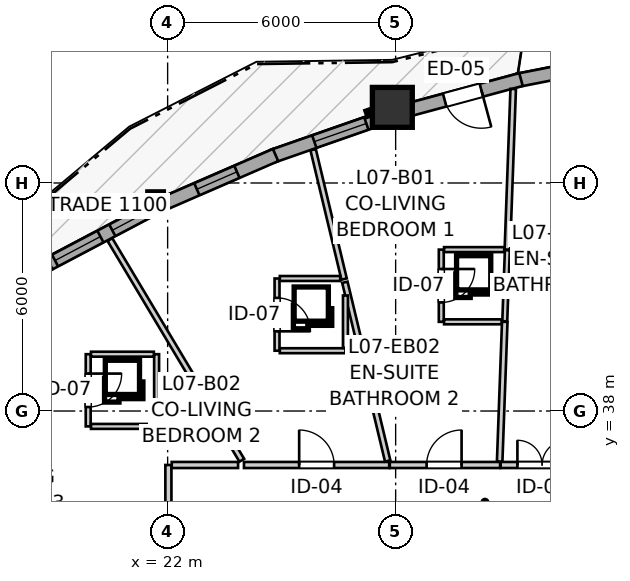
"""IFC4 building model, lengths in metres.
Left out: names, types, materials, properties, quantities, classifications, styles, units other than length and angle.
Written with IfcOpenShell. Run it as: python <this file> out.ifc"""

import sys

from ifc_helpers import new_model, si_unit, direction, frame, frame_2d, origin, origin_2d, place, context, subcontext, project, spatial, rectangle, i_section, extrude, source, transform, mapped, element, fill, save


model = new_model("IFC4")
c1 = context("Model", 3, precision=1e-05, world=origin(), true_north=direction((0.0, 1.0)))
c2 = subcontext(c1, "Body", "Model", "MODEL_VIEW")
j1 = project(units=[si_unit("LENGTHUNIT", "METRE"), si_unit("PLANEANGLEUNIT", "RADIAN")], contexts=[c1])
p1 = place(None, origin())
s1 = spatial("IfcSite", under=j1, at=p1, CompositionType="ELEMENT")
p2 = place(p1, origin())
s2 = spatial("IfcBuilding", under=s1, at=p2, CompositionType="ELEMENT")
p3 = place(p2, frame((0.0, 0.0, 27.0)))
s3 = spatial("IfcBuildingStorey", under=s2, at=p3, CompositionType="ELEMENT", Elevation=27.0)
m1 = source(origin(), c2, "Body", "SweptSolid", [
    extrude(rectangle(XDim=1.05, YDim=1.05, at=origin_2d()), origin(), (0.0, 0.0, 1.0), 2.935),
])
p4 = place(p3, frame((27.913, 45.99, 0.0), z_axis=(0.0, 0.0, 1.0), x_axis=(1.0, 0.0, 0.0)))
e1 = element("IfcColumn", 1, at=p4, inside=s3, PredefinedType="COLUMN", context=c2, shape_type="MappedRepresentation", body=[
    mapped(m1, transform((0.0, 0.0, 0.0), x_axis=(1.0, 0.0, 0.0), y_axis=(0.0, 1.0, 0.0), z_axis=(0.0, 0.0, 1.0), scale=1.0)),
])
m2 = source(origin(), c2, "Body", "SweptSolid", [
    extrude(i_section(OverallWidth=0.409, OverallDepth=0.425, WebThickness=0.03, FlangeThickness=0.048, FilletRadius=0.015, at=origin_2d()), origin(), (0.0, 0.0, 1.0), 2.935),
])
p5 = place(p3, frame((21.683, 43.554, 0.0), z_axis=(0.0, 0.0, 1.0), x_axis=(1.0, 0.0, 0.0)))
e2 = element("IfcColumn", 2, at=p5, inside=s3, PredefinedType="PILASTER", context=c2, shape_type="MappedRepresentation", body=[
    mapped(m2, transform((0.0, 0.0, 0.0), x_axis=(1.0, 0.0, 0.0), y_axis=(0.0, 1.0, 0.0), z_axis=(0.0, 0.0, 1.0), scale=1.0)),
])
p6 = place(p3, frame((34.659, 47.38, 0.0), z_axis=(0.0, 0.0, 1.0), x_axis=(-0.981222284826, -0.19288034571, 0.0)))
e3 = element("IfcWall", 3, at=p6, inside=s3, PredefinedType="SOLIDWALL", context=c2, shape_type="SweptSolid", body=[
    extrude(rectangle(XDim=3.512, YDim=0.35, at=frame_2d((1.756, 0.0))), origin(), (0.0, 0.0, 1.0), 2.415),
])
p7 = place(p6, frame((1.021, 0.0, 0.82)))
e4 = element("IfcOpeningElement", 4, at=p7, cuts=e3, PredefinedType="OPENING", context=c2, shape_type="SweptSolid", body=[
    extrude(rectangle(XDim=1.45, YDim=1.25, at=frame_2d((0.725, 0.625))), frame((0.0, 0.185, 0.0), z_axis=(0.0, -1.0, 0.0), x_axis=(1.0, 0.0, 0.0)), (0.0, 0.0, 1.0), 0.37),
])
p8 = place(p3, frame((31.298, 46.722, 0.0), z_axis=(0.0, 0.0, 1.0), x_axis=(-0.965455913242, -0.260566459057, 0.0)))
e5 = element("IfcWall", 5, at=p8, inside=s3, PredefinedType="SOLIDWALL", context=c2, shape_type="SweptSolid", body=[
    extrude(rectangle(XDim=3.159, YDim=0.35, at=frame_2d((1.58, 0.0))), origin(), (0.0, 0.0, 1.0), 2.415),
])
p9 = place(p8, frame((1.08, 0.0, 0.0)))
e6 = element("IfcOpeningElement", 6, at=p9, cuts=e5, PredefinedType="OPENING", context=c2, shape_type="SweptSolid", body=[
    extrude(rectangle(XDim=1.0, YDim=2.1, at=frame_2d((0.5, 1.05))), frame((0.0, 0.185, 0.0), z_axis=(0.0, -1.0, 0.0), x_axis=(1.0, 0.0, 0.0)), (0.0, 0.0, 1.0), 0.37),
])
p10 = place(p3, frame((27.687, 45.726, 0.0), z_axis=(0.0, 0.0, 1.0), x_axis=(-0.9441205041, -0.329600475936, 0.0)))
e7 = element("IfcWall", 7, at=p10, inside=s3, PredefinedType="SOLIDWALL", context=c2, shape_type="SweptSolid", body=[
    extrude(rectangle(XDim=3.104, YDim=0.35, at=frame_2d((1.552, 0.0))), origin(), (0.0, 0.0, 1.0), 2.415),
])
p11 = place(p10, frame((0.486, 0.0, 0.82)))
e8 = element("IfcOpeningElement", 8, at=p11, cuts=e7, PredefinedType="OPENING", context=c2, shape_type="SweptSolid", body=[
    extrude(rectangle(XDim=1.45, YDim=1.25, at=frame_2d((0.725, 0.625))), frame((0.0, 0.185, 0.0), z_axis=(0.0, -1.0, 0.0), x_axis=(1.0, 0.0, 0.0)), (0.0, 0.0, 1.0), 0.37),
])
p12 = place(p3, frame((24.84, 44.735, 0.0), z_axis=(0.0, 0.0, 1.0), x_axis=(-0.917090935142, -0.398678086532, 0.0)))
e9 = element("IfcWall", 9, at=p12, inside=s3, PredefinedType="SOLIDWALL", context=c2, shape_type="SweptSolid", body=[
    extrude(rectangle(XDim=3.346, YDim=0.35, at=frame_2d((1.673, 0.0))), origin(), (0.0, 0.0, 1.0), 2.415),
])
p13 = place(p12, frame((1.108, 0.0, 0.82)))
e10 = element("IfcOpeningElement", 10, at=p13, cuts=e9, PredefinedType="OPENING", context=c2, shape_type="SweptSolid", body=[
    extrude(rectangle(XDim=1.15, YDim=1.2, at=frame_2d((0.575, 0.6))), frame((0.0, 0.185, 0.0), z_axis=(0.0, -1.0, 0.0), x_axis=(1.0, 0.0, 0.0)), (0.0, 0.0, 1.0), 0.37),
])
p14 = place(p3, frame((21.747, 43.39, 0.0), z_axis=(0.0, 0.0, 1.0), x_axis=(-0.88437802144, -0.46677137358, 0.0)))
e11 = element("IfcWall", 11, at=p14, inside=s3, PredefinedType="SOLIDWALL", context=c2, shape_type="SweptSolid", body=[
    extrude(rectangle(XDim=3.327, YDim=0.35, at=frame_2d((1.664, 0.0))), origin(), (0.0, 0.0, 1.0), 2.415),
])
p15 = place(p14, frame((0.311, 0.0, 0.82)))
e12 = element("IfcOpeningElement", 12, at=p15, cuts=e11, PredefinedType="OPENING", context=c2, shape_type="SweptSolid", body=[
    extrude(rectangle(XDim=1.05, YDim=1.45, at=frame_2d((0.525, 0.725))), frame((0.0, 0.185, 0.0), z_axis=(0.0, -1.0, 0.0), x_axis=(1.0, 0.0, 0.0)), (0.0, 0.0, 1.0), 0.37),
])
p16 = place(p14, frame((1.714, 0.0, 0.82)))
e13 = element("IfcOpeningElement", 13, at=p16, cuts=e11, PredefinedType="OPENING", context=c2, shape_type="SweptSolid", body=[
    extrude(rectangle(XDim=1.35, YDim=1.45, at=frame_2d((0.675, 0.725))), frame((0.0, 0.185, 0.0), z_axis=(0.0, -1.0, 0.0), x_axis=(1.0, 0.0, 0.0)), (0.0, 0.0, 1.0), 0.37),
])
p17 = place(p3, frame((18.882, 41.882, 0.0), z_axis=(0.0, 0.0, 1.0), x_axis=(-0.846428134238, -0.53250297048, 0.0)))
e14 = element("IfcWall", 14, at=p17, inside=s3, PredefinedType="SOLIDWALL", context=c2, shape_type="SweptSolid", body=[
    extrude(rectangle(XDim=3.047, YDim=0.35, at=frame_2d((1.523, 0.0))), origin(), (0.0, 0.0, 1.0), 2.415),
])
p18 = place(p17, frame((0.803, 0.0, 0.82)))
e15 = element("IfcOpeningElement", 15, at=p18, cuts=e14, PredefinedType="OPENING", context=c2, shape_type="SweptSolid", body=[
    extrude(rectangle(XDim=1.45, YDim=1.25, at=frame_2d((0.725, 0.625))), frame((0.0, 0.185, 0.0), z_axis=(0.0, -1.0, 0.0), x_axis=(1.0, 0.0, 0.0)), (0.0, 0.0, 1.0), 0.37),
])
p19 = place(p3, frame((22.02, 32.71, 0.0), z_axis=(0.0, 0.0, 1.0), x_axis=(0.0, 1.0, 0.0)))
e16 = element("IfcWall", 16, at=p19, inside=s3, PredefinedType="PARTITIONING", context=c2, shape_type="SweptSolid", body=[
    extrude(rectangle(XDim=3.87, YDim=0.16, at=frame_2d((1.935, 0.0))), origin(), (0.0, 0.0, 1.0), 2.935),
])
p20 = place(p19, frame((1.485, 0.0, 0.0)))
e17 = element("IfcOpeningElement", 17, at=p20, cuts=e16, PredefinedType="OPENING", context=c2, shape_type="SweptSolid", body=[
    extrude(rectangle(XDim=0.92, YDim=2.1, at=frame_2d((0.46, 1.05))), frame((0.0, 0.09, 0.0), z_axis=(0.0, -1.0, 0.0), x_axis=(1.0, 0.0, 0.0)), (0.0, 0.0, 1.0), 0.18),
])
p21 = place(p3, frame((24.009, 36.58, 0.0), z_axis=(0.0, 0.0, 1.0), x_axis=(1.0, 0.0, 0.0)))
e18 = element("IfcWall", 18, at=p21, inside=s3, PredefinedType="PARTITIONING", context=c2, shape_type="SweptSolid", body=[
    extrude(rectangle(XDim=3.822, YDim=0.16, at=frame_2d((1.911, 0.0))), origin(), (0.0, 0.0, 1.0), 2.543),
])
p22 = place(p21, frame((1.452, 0.0, 0.0)))
e19 = element("IfcOpeningElement", 19, at=p22, cuts=e18, PredefinedType="OPENING", context=c2, shape_type="SweptSolid", body=[
    extrude(rectangle(XDim=0.92, YDim=2.1, at=frame_2d((0.46, 1.05))), frame((0.0, 0.09, 0.0), z_axis=(0.0, -1.0, 0.0), x_axis=(1.0, 0.0, 0.0)), (0.0, 0.0, 1.0), 0.18),
])
p23 = place(p3, frame((27.846, 36.58, 0.0), z_axis=(0.0, 0.0, 1.0), x_axis=(1.0, 0.0, 0.0)))
e20 = element("IfcWall", 20, at=p23, inside=s3, PredefinedType="PARTITIONING", context=c2, shape_type="SweptSolid", body=[
    extrude(rectangle(XDim=2.903, YDim=0.16, at=frame_2d((1.452, 0.0))), origin(), (0.0, 0.0, 1.0), 2.935),
])
p24 = place(p23, frame((0.969, 0.0, 0.0)))
e21 = element("IfcOpeningElement", 21, at=p24, cuts=e20, PredefinedType="OPENING", context=c2, shape_type="SweptSolid", body=[
    extrude(rectangle(XDim=0.92, YDim=2.1, at=frame_2d((0.46, 1.05))), frame((0.0, 0.09, 0.0), z_axis=(0.0, -1.0, 0.0), x_axis=(1.0, 0.0, 0.0)), (0.0, 0.0, 1.0), 0.18),
])
p25 = place(p3, frame((30.764, 36.58, 0.0), z_axis=(0.0, 0.0, 1.0), x_axis=(1.0, 0.0, 0.0)))
e22 = element("IfcWall", 22, at=p25, inside=s3, PredefinedType="PARTITIONING", context=c2, shape_type="SweptSolid", body=[
    extrude(rectangle(XDim=2.225, YDim=0.16, at=frame_2d((1.113, 0.0))), origin(), (0.0, 0.0, 1.0), 2.935),
])
p26 = place(p25, frame((0.44, 0.0, 0.0)))
e23 = element("IfcOpeningElement", 23, at=p26, cuts=e22, PredefinedType="OPENING", context=c2, shape_type="SweptSolid", body=[
    extrude(rectangle(XDim=1.3, YDim=2.1, at=frame_2d((0.65, 1.05))), frame((0.0, 0.09, 0.0), z_axis=(0.0, -1.0, 0.0), x_axis=(1.0, 0.0, 0.0)), (0.0, 0.0, 1.0), 0.18),
])
p27 = place(p3, frame((29.201, 42.247, 0.0), z_axis=(0.0, 0.0, 1.0), x_axis=(0.0, -1.0, 0.0)))
e24 = element("IfcWall", 24, at=p27, inside=s3, PredefinedType="PARTITIONING", context=c2, shape_type="SweptSolid", body=[
    extrude(rectangle(XDim=1.9, YDim=0.13, at=frame_2d((0.95, 0.0))), origin(), (0.0, 0.0, 1.0), 2.935),
])
p28 = place(p27, frame((0.51, 0.0, 0.0)))
e25 = element("IfcOpeningElement", 25, at=p28, cuts=e24, PredefinedType="OPENING", context=c2, shape_type="SweptSolid", body=[
    extrude(rectangle(XDim=0.88, YDim=2.05, at=frame_2d((0.44, 1.025))), frame((0.0, 0.075, 0.0), z_axis=(0.0, -1.0, 0.0), x_axis=(1.0, 0.0, 0.0)), (0.0, 0.0, 1.0), 0.15),
])
p29 = place(p3, frame((24.879, 41.487, 0.0), z_axis=(0.0, 0.0, 1.0), x_axis=(0.0, -1.0, 0.0)))
e26 = element("IfcWall", 26, at=p29, inside=s3, PredefinedType="PARTITIONING", context=c2, shape_type="SweptSolid", body=[
    extrude(rectangle(XDim=1.9, YDim=0.13, at=frame_2d((0.95, 0.0))), origin(), (0.0, 0.0, 1.0), 2.935),
])
p30 = place(p29, frame((0.51, 0.0, 0.0)))
e27 = element("IfcOpeningElement", 27, at=p30, cuts=e26, PredefinedType="OPENING", context=c2, shape_type="SweptSolid", body=[
    extrude(rectangle(XDim=0.88, YDim=2.05, at=frame_2d((0.44, 1.025))), frame((0.0, 0.075, 0.0), z_axis=(0.0, -1.0, 0.0), x_axis=(1.0, 0.0, 0.0)), (0.0, 0.0, 1.0), 0.15),
])
p31 = place(p3, frame((19.91, 39.495, 0.0), z_axis=(0.0, 0.0, 1.0), x_axis=(0.0, -1.0, 0.0)))
e28 = element("IfcWall", 28, at=p31, inside=s3, PredefinedType="PARTITIONING", context=c2, shape_type="SweptSolid", body=[
    extrude(rectangle(XDim=1.9, YDim=0.13, at=frame_2d((0.95, 0.0))), origin(), (0.0, 0.0, 1.0), 2.935),
])
p32 = place(p31, frame((0.51, 0.0, 0.0)))
e29 = element("IfcOpeningElement", 29, at=p32, cuts=e28, PredefinedType="OPENING", context=c2, shape_type="SweptSolid", body=[
    extrude(rectangle(XDim=0.88, YDim=2.05, at=frame_2d((0.44, 1.025))), frame((0.0, 0.075, 0.0), z_axis=(0.0, -1.0, 0.0), x_axis=(1.0, 0.0, 0.0)), (0.0, 0.0, 1.0), 0.15),
])
p33 = place(p3, frame((11.92, 36.618, 0.0), z_axis=(0.0, 0.0, 1.0), x_axis=(0.866473494239, -0.499223080177, 0.0)))
e30 = element("IfcWall", 30, at=p33, inside=s3, PredefinedType="PARTITIONING", context=c2, shape_type="SweptSolid", body=[
    extrude(rectangle(XDim=11.514, YDim=0.145, at=frame_2d((5.757, 0.0))), origin(), (0.0, 0.0, 1.0), 2.935),
])
p34 = place(p3, frame((14.566, 38.751, 0.0), z_axis=(0.0, 0.0, 1.0), x_axis=(0.777881688073, -0.628410756879, 0.0)))
e31 = element("IfcWall", 31, at=p34, inside=s3, PredefinedType="PARTITIONING", context=c2, shape_type="SweptSolid", body=[
    extrude(rectangle(XDim=9.413, YDim=0.145, at=frame_2d((4.707, 0.0))), origin(), (0.0, 0.0, 1.0), 2.935),
])
p35 = place(p3, frame((20.481, 42.51, 0.0), z_axis=(0.0, 0.0, 1.0), x_axis=(0.513067331262, -0.858348363773, 0.0)))
e32 = element("IfcWall", 32, at=p35, inside=s3, PredefinedType="PARTITIONING", context=c2, shape_type="SweptSolid", body=[
    extrude(rectangle(XDim=6.765, YDim=0.145, at=frame_2d((3.382, 0.0))), origin(), (0.0, 0.0, 1.0), 2.935),
])
p36 = place(p3, frame((26.664, 41.388, 0.0), z_axis=(0.0, 0.0, 1.0), x_axis=(0.233021630241, -0.972471552201, 0.0)))
e33 = element("IfcWall", 33, at=p36, inside=s3, PredefinedType="PARTITIONING", context=c2, shape_type="SweptSolid", body=[
    extrude(rectangle(XDim=4.836, YDim=0.145, at=frame_2d((2.418, 0.0))), origin(), (0.0, 0.0, 1.0), 2.935),
])
p37 = place(p3, frame((30.94, 42.247, 0.0), z_axis=(0.0, 0.0, 1.0), x_axis=(0.03624948077, 0.999342771597, 0.0)))
e34 = element("IfcWall", 34, at=p37, inside=s3, PredefinedType="PARTITIONING", context=c2, shape_type="SweptSolid", body=[
    extrude(rectangle(XDim=4.229, YDim=0.145, at=frame_2d((2.115, 0.0))), origin(), (0.0, 0.0, 1.0), 2.935),
])
p38 = place(p3, frame((30.737, 36.671, 0.0), z_axis=(0.0, 0.0, 1.0), x_axis=(0.036368539535, 0.999338445839, 0.0)))
e35 = element("IfcWall", 35, at=p38, inside=s3, PredefinedType="PARTITIONING", context=c2, shape_type="SweptSolid", body=[
    extrude(rectangle(XDim=3.679, YDim=0.145, at=frame_2d((1.839, 0.0))), origin(), (0.0, 0.0, 1.0), 2.935),
])
p39 = place(p3, frame((25.829, 44.875, 0.0), z_axis=(0.0, 0.0, 1.0), x_axis=(0.232921769711, -0.972495475154, 0.0)))
e36 = element("IfcWall", 36, at=p39, inside=s3, PredefinedType="PARTITIONING", context=c2, shape_type="SweptSolid", body=[
    extrude(rectangle(XDim=3.5, YDim=0.145, at=frame_2d((1.75, 0.0))), origin(), (0.0, 0.0, 1.0), 2.935),
])
p40 = place(p3, frame((22.108, 36.58, 0.0), z_axis=(0.0, 0.0, 1.0), x_axis=(1.0, 0.0, 0.0)))
e37 = element("IfcWall", 37, at=p40, inside=s3, PredefinedType="PARTITIONING", context=c2, shape_type="SweptSolid", body=[
    extrude(rectangle(XDim=1.746, YDim=0.16, at=frame_2d((0.873, 0.0))), origin(), (0.0, 0.0, 1.0), 2.543),
])
p41 = place(p3, frame((21.71, 37.595, 0.0), z_axis=(0.0, 0.0, 1.0), x_axis=(0.0, 1.0, 0.0)))
e38 = element("IfcWall", 38, at=p41, inside=s3, PredefinedType="PARTITIONING", context=c2, shape_type="SweptSolid", body=[
    extrude(rectangle(XDim=1.9, YDim=0.13, at=frame_2d((0.95, 0.0))), origin(), (0.0, 0.0, 1.0), 2.935),
])
p42 = place(p3, frame((30.872, 40.362, 0.0), z_axis=(0.0, 0.0, 1.0), x_axis=(0.036273279858, 0.999341908042, 0.0)))
e39 = element("IfcWall", 39, at=p42, inside=s3, PredefinedType="PARTITIONING", context=c2, shape_type="SweptSolid", body=[
    extrude(rectangle(XDim=1.871, YDim=0.13, at=frame_2d((0.936, 0.0))), origin(), (0.0, 0.0, 1.0), 2.935),
])
for number, where, z_axis, x_axis in (
    (40, (19.983, 39.495, 0.0), (0.0, 0.0, 1.0), (1.0, 0.0, 0.0)),
    (41, (19.983, 37.595, 0.0), (0.0, 0.0, 1.0), (1.0, 0.0, 0.0)),
):
    element("IfcWall", number, at=place(p3, frame(where, z_axis=z_axis, x_axis=x_axis)), inside=s3, PredefinedType="PARTITIONING", context=c2, shape_type="SweptSolid", body=[
        extrude(rectangle(XDim=1.654, YDim=0.13, at=frame_2d((0.827, 0.0))), origin(), (0.0, 0.0, 1.0), 2.935),
    ])
p43 = place(p3, frame((24.952, 39.587, 0.0), z_axis=(0.0, 0.0, 1.0), x_axis=(1.0, 0.0, 0.0)))
e42 = element("IfcWall", 42, at=p43, inside=s3, PredefinedType="PARTITIONING", context=c2, shape_type="SweptSolid", body=[
    extrude(rectangle(XDim=1.727, YDim=0.13, at=frame_2d((0.864, 0.0))), origin(), (0.0, 0.0, 1.0), 2.935),
])
p44 = place(p3, frame((24.952, 41.487, 0.0), z_axis=(0.0, 0.0, 1.0), x_axis=(1.0, 0.0, 0.0)))
e43 = element("IfcWall", 43, at=p44, inside=s3, PredefinedType="PARTITIONING", context=c2, shape_type="SweptSolid", body=[
    extrude(rectangle(XDim=1.59, YDim=0.13, at=frame_2d((0.795, 0.0))), origin(), (0.0, 0.0, 1.0), 2.503),
])
p45 = place(p3, frame((29.274, 42.247, 0.0), z_axis=(0.0, 0.0, 1.0), x_axis=(1.0, 0.0, 0.0)))
e44 = element("IfcWall", 44, at=p45, inside=s3, PredefinedType="PARTITIONING", context=c2, shape_type="SweptSolid", body=[
    extrude(rectangle(XDim=1.583, YDim=0.13, at=frame_2d((0.792, 0.0))), origin(), (0.0, 0.0, 1.0), 2.503),
])
p46 = place(p3, frame((26.679, 39.66, 0.0), z_axis=(0.0, 0.0, 1.0), x_axis=(0.0, 1.0, 0.0)))
e45 = element("IfcWall", 45, at=p46, inside=s3, PredefinedType="PARTITIONING", context=c2, shape_type="SweptSolid", body=[
    extrude(rectangle(XDim=1.38, YDim=0.13, at=frame_2d((0.69, 0.0))), origin(), (0.0, 0.0, 1.0), 2.935),
])
p47 = place(p3, frame((29.274, 40.347, 0.0), z_axis=(0.0, 0.0, 1.0), x_axis=(1.0, 0.0, 0.0)))
e46 = element("IfcWall", 46, at=p47, inside=s3, PredefinedType="PARTITIONING", context=c2, shape_type="SweptSolid", body=[
    extrude(rectangle(XDim=1.514, YDim=0.13, at=frame_2d((0.757, 0.0))), origin(), (0.0, 0.0, 1.0), 2.935),
])
m3 = source(origin(), c2, "Body", "SweptSolid", [
    extrude(rectangle(XDim=1.45, YDim=1.25, at=frame_2d((0.725, 0.625))), frame((0.0, 0.03, 0.0), z_axis=(0.0, -1.0, 0.0), x_axis=(1.0, 0.0, 0.0)), (0.0, 0.0, 1.0), 0.06),
])
p48 = place(p11, origin())
e47 = element("IfcWindow", 47, at=p48, inside=s3, PartitioningType="SINGLE_PANEL", PredefinedType="WINDOW", context=c2, shape_type="MappedRepresentation", body=[
    mapped(m3, transform((0.0, 0.0, 0.0), x_axis=(1.0, 0.0, 0.0), y_axis=(0.0, 1.0, 0.0), z_axis=(0.0, 0.0, 1.0), scale=1.0)),
])
fill(e8, e47)
m4 = source(origin(), c2, "Body", "SweptSolid", [
    extrude(rectangle(XDim=1.15, YDim=1.2, at=frame_2d((0.575, 0.6))), frame((0.0, 0.03, 0.0), z_axis=(0.0, -1.0, 0.0), x_axis=(1.0, 0.0, 0.0)), (0.0, 0.0, 1.0), 0.06),
])
p49 = place(p13, origin())
e48 = element("IfcWindow", 48, at=p49, inside=s3, PartitioningType="SINGLE_PANEL", PredefinedType="WINDOW", context=c2, shape_type="MappedRepresentation", body=[
    mapped(m4, transform((0.0, 0.0, 0.0), x_axis=(1.0, 0.0, 0.0), y_axis=(0.0, 1.0, 0.0), z_axis=(0.0, 0.0, 1.0), scale=1.0)),
])
fill(e10, e48)
m5 = source(origin(), c2, "Body", "SweptSolid", [
    extrude(rectangle(XDim=1.05, YDim=1.45, at=frame_2d((0.525, 0.725))), frame((0.0, 0.03, 0.0), z_axis=(0.0, -1.0, 0.0), x_axis=(1.0, 0.0, 0.0)), (0.0, 0.0, 1.0), 0.06),
])
p50 = place(p15, origin())
e49 = element("IfcWindow", 49, at=p50, inside=s3, PartitioningType="SINGLE_PANEL", PredefinedType="WINDOW", context=c2, shape_type="MappedRepresentation", body=[
    mapped(m5, transform((0.0, 0.0, 0.0), x_axis=(1.0, 0.0, 0.0), y_axis=(0.0, 1.0, 0.0), z_axis=(0.0, 0.0, 1.0), scale=1.0)),
])
fill(e12, e49)
m6 = source(origin(), c2, "Body", "SweptSolid", [
    extrude(rectangle(XDim=1.35, YDim=1.45, at=frame_2d((0.675, 0.725))), frame((0.0, 0.03, 0.0), z_axis=(0.0, -1.0, 0.0), x_axis=(1.0, 0.0, 0.0)), (0.0, 0.0, 1.0), 0.06),
])
p51 = place(p16, origin())
e50 = element("IfcWindow", 50, at=p51, inside=s3, PartitioningType="SINGLE_PANEL", PredefinedType="WINDOW", context=c2, shape_type="MappedRepresentation", body=[
    mapped(m6, transform((0.0, 0.0, 0.0), x_axis=(1.0, 0.0, 0.0), y_axis=(0.0, 1.0, 0.0), z_axis=(0.0, 0.0, 1.0), scale=1.0)),
])
fill(e13, e50)
m7 = source(origin(), c2, "Body", "SweptSolid", [
    extrude(rectangle(XDim=1.0, YDim=2.1, at=frame_2d((0.5, 1.05))), frame((0.0, 0.025, 0.0), z_axis=(0.0, -1.0, 0.0), x_axis=(1.0, 0.0, 0.0)), (0.0, 0.0, 1.0), 0.05),
])
p52 = place(p9, origin())
e51 = element("IfcDoor", 51, at=p52, inside=s3, OperationType="SINGLE_SWING_LEFT", PredefinedType="DOOR", context=c2, shape_type="MappedRepresentation", body=[
    mapped(m7, transform((0.0, 0.0, 0.0), x_axis=(1.0, 0.0, 0.0), y_axis=(0.0, 1.0, 0.0), z_axis=(0.0, 0.0, 1.0), scale=1.0)),
])
fill(e6, e51)
m8 = source(origin(), c2, "Body", "SweptSolid", [
    extrude(rectangle(XDim=0.92, YDim=2.1, at=frame_2d((0.46, 1.05))), frame((0.0, 0.025, 0.0), z_axis=(0.0, -1.0, 0.0), x_axis=(1.0, 0.0, 0.0)), (0.0, 0.0, 1.0), 0.05),
])
p53 = place(p22, origin())
e52 = element("IfcDoor", 52, at=p53, inside=s3, OperationType="SINGLE_SWING_LEFT", PredefinedType="DOOR", context=c2, shape_type="MappedRepresentation", body=[
    mapped(m8, transform((0.0, 0.0, 0.0), x_axis=(1.0, 0.0, 0.0), y_axis=(0.0, 1.0, 0.0), z_axis=(0.0, 0.0, 1.0), scale=1.0)),
])
fill(e19, e52)
p54 = place(p24, origin())
e53 = element("IfcDoor", 53, at=p54, inside=s3, OperationType="SINGLE_SWING_RIGHT", PredefinedType="DOOR", context=c2, shape_type="MappedRepresentation", body=[
    mapped(m8, transform((0.0, 0.0, 0.0), x_axis=(1.0, 0.0, 0.0), y_axis=(0.0, 1.0, 0.0), z_axis=(0.0, 0.0, 1.0), scale=1.0)),
])
fill(e21, e53)
m9 = source(origin(), c2, "Body", "SweptSolid", [
    extrude(rectangle(XDim=1.3, YDim=2.1, at=frame_2d((0.65, 1.05))), frame((0.0, 0.025, 0.0), z_axis=(0.0, -1.0, 0.0), x_axis=(1.0, 0.0, 0.0)), (0.0, 0.0, 1.0), 0.05),
])
p55 = place(p26, origin())
e54 = element("IfcDoor", 54, at=p55, inside=s3, OperationType="DOUBLE_DOOR_SINGLE_SWING", PredefinedType="DOOR", context=c2, shape_type="MappedRepresentation", body=[
    mapped(m9, transform((0.0, 0.0, 0.0), x_axis=(1.0, 0.0, 0.0), y_axis=(0.0, 1.0, 0.0), z_axis=(0.0, 0.0, 1.0), scale=1.0)),
])
fill(e23, e54)
m10 = source(origin(), c2, "Body", "SweptSolid", [
    extrude(rectangle(XDim=0.88, YDim=2.05, at=frame_2d((0.44, 1.025))), frame((0.0, 0.025, 0.0), z_axis=(0.0, -1.0, 0.0), x_axis=(1.0, 0.0, 0.0)), (0.0, 0.0, 1.0), 0.05),
])
p56 = place(p28, origin())
e55 = element("IfcDoor", 55, at=p56, inside=s3, OperationType="SINGLE_SWING_LEFT", PredefinedType="DOOR", context=c2, shape_type="MappedRepresentation", body=[
    mapped(m10, transform((0.0, 0.0, 0.0), x_axis=(1.0, 0.0, 0.0), y_axis=(0.0, 1.0, 0.0), z_axis=(0.0, 0.0, 1.0), scale=1.0)),
])
fill(e25, e55)
p57 = place(p30, origin())
e56 = element("IfcDoor", 56, at=p57, inside=s3, OperationType="SINGLE_SWING_RIGHT", PredefinedType="DOOR", context=c2, shape_type="MappedRepresentation", body=[
    mapped(m10, transform((0.0, 0.0, 0.0), x_axis=(1.0, 0.0, 0.0), y_axis=(0.0, 1.0, 0.0), z_axis=(0.0, 0.0, 1.0), scale=1.0)),
])
fill(e27, e56)
p58 = place(p32, origin())
e57 = element("IfcDoor", 57, at=p58, inside=s3, OperationType="SINGLE_SWING_LEFT", PredefinedType="DOOR", context=c2, shape_type="MappedRepresentation", body=[
    mapped(m10, transform((0.0, 0.0, 0.0), x_axis=(1.0, 0.0, 0.0), y_axis=(0.0, 1.0, 0.0), z_axis=(0.0, 0.0, 1.0), scale=1.0)),
])
fill(e29, e57)
save(model, sys.argv[1])
